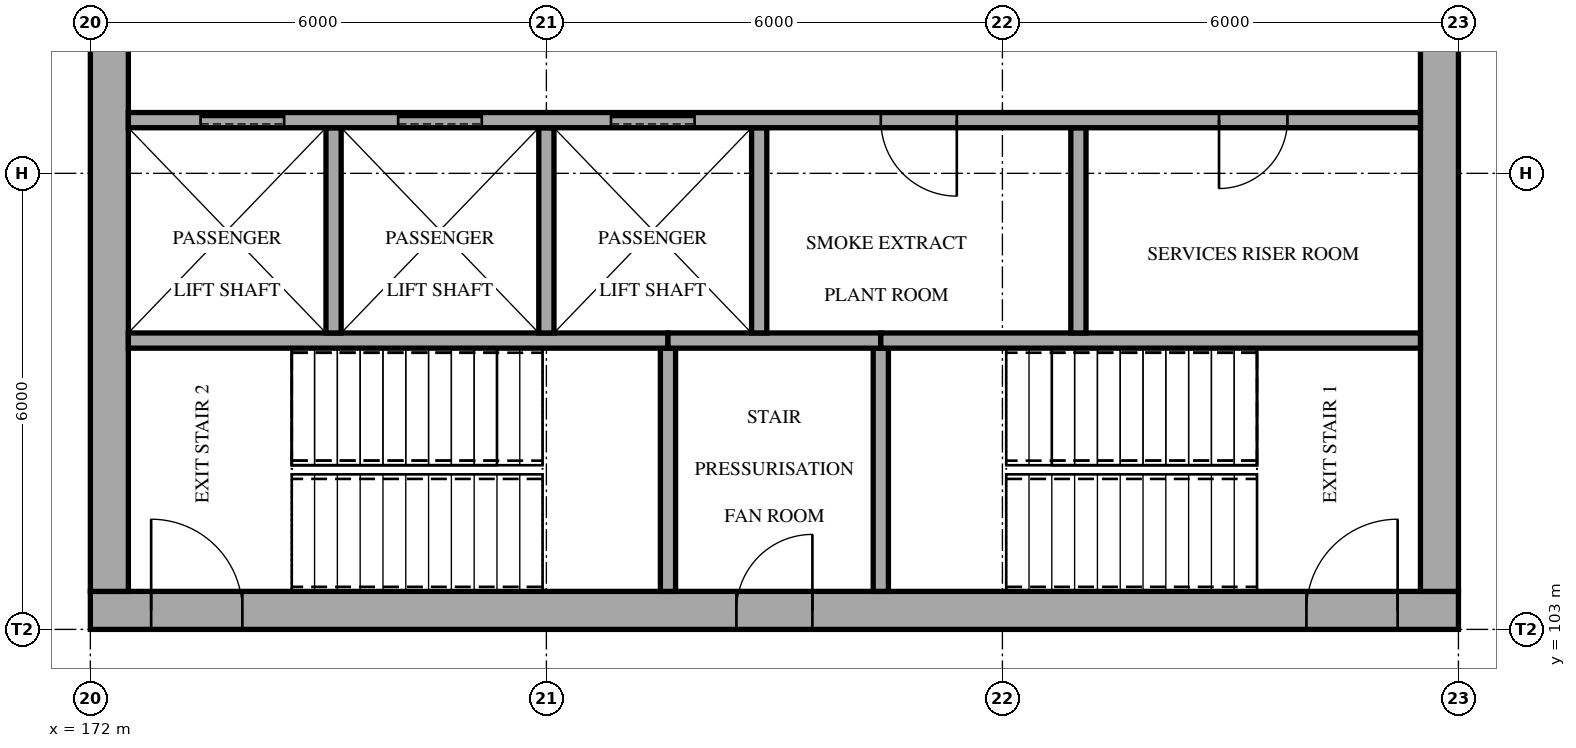
"""IFC4 building model, lengths in metres.
Left out: names, types, materials, properties, quantities, classifications, styles, units other than length and angle.
Written with IfcOpenShell. Run it as: python <this file> out.ifc"""

import sys

from ifc_helpers import new_model, si_unit, direction, frame, frame_2d, origin, place, context, subcontext, project, spatial, rectangle, extrude, element, fill, save


model = new_model("IFC4")
c1 = context("Model", 3, precision=1e-05, world=origin(), true_north=direction((0.0, 1.0)))
c2 = subcontext(c1, "Body", "Model", "MODEL_VIEW")
j1 = project(units=[si_unit("LENGTHUNIT", "METRE"), si_unit("PLANEANGLEUNIT", "RADIAN")], contexts=[c1])
p1 = place(None, origin())
s1 = spatial("IfcSite", under=j1, at=p1, CompositionType="ELEMENT")
p2 = place(p1, origin())
s2 = spatial("IfcBuilding", under=s1, at=p2, CompositionType="ELEMENT")
p3 = place(p2, frame((0.0, 0.0, 5.0)))
s3 = spatial("IfcBuildingStorey", under=s2, at=p3, CompositionType="ELEMENT", Elevation=5.0)
p4 = place(p3, frame((172.0, 103.25, 0.0), z_axis=(0.0, 0.0, 1.0), x_axis=(1.0, 0.0, 0.0)))
e1 = element("IfcWall", 1, at=p4, inside=s3, PredefinedType="SHEAR", context=c2, shape_type="SweptSolid", body=[
    extrude(rectangle(XDim=18.0, YDim=0.5, at=frame_2d((9.0, 0.0))), origin(), (0.0, 0.0, 1.0), 5.0),
])
p5 = place(p4, frame((8.5, 0.0, 0.0)))
e2 = element("IfcOpeningElement", 2, at=p5, cuts=e1, PredefinedType="OPENING", context=c2, shape_type="SweptSolid", body=[
    extrude(rectangle(XDim=1.0, YDim=2.1, at=frame_2d((0.5, 1.05))), frame((0.0, 0.26, 0.0), z_axis=(0.0, -1.0, 0.0), x_axis=(1.0, 0.0, 0.0)), (0.0, 0.0, 1.0), 0.52),
])
p6 = place(p4, frame((0.8, 0.0, 0.0)))
e3 = element("IfcOpeningElement", 3, at=p6, cuts=e1, PredefinedType="OPENING", context=c2, shape_type="SweptSolid", body=[
    extrude(rectangle(XDim=1.2, YDim=2.1, at=frame_2d((0.6, 1.05))), frame((0.0, 0.26, 0.0), z_axis=(0.0, -1.0, 0.0), x_axis=(1.0, 0.0, 0.0)), (0.0, 0.0, 1.0), 0.52),
])
p7 = place(p4, frame((16.0, 0.0, 0.0)))
e4 = element("IfcOpeningElement", 4, at=p7, cuts=e1, PredefinedType="OPENING", context=c2, shape_type="SweptSolid", body=[
    extrude(rectangle(XDim=1.2, YDim=2.1, at=frame_2d((0.6, 1.05))), frame((0.0, 0.26, 0.0), z_axis=(0.0, -1.0, 0.0), x_axis=(1.0, 0.0, 0.0)), (0.0, 0.0, 1.0), 0.52),
])
p8 = place(p3, frame((172.25, 103.5, 0.0), z_axis=(0.0, 0.0, 1.0), x_axis=(0.0, 1.0, 0.0)))
e5 = element("IfcWall", 5, at=p8, inside=s3, PredefinedType="SHEAR", context=c2, shape_type="SweptSolid", body=[
    extrude(rectangle(XDim=17.0, YDim=0.5, at=frame_2d((8.5, 0.0))), origin(), (0.0, 0.0, 1.0), 5.0),
])
p9 = place(p8, frame((7.2, 0.0, 0.0)))
e6 = element("IfcOpeningElement", 6, at=p9, cuts=e5, PredefinedType="OPENING", context=c2, shape_type="SweptSolid", body=[
    extrude(rectangle(XDim=1.4, YDim=2.1, at=frame_2d((0.7, 1.05))), frame((0.0, 0.26, 0.0), z_axis=(0.0, -1.0, 0.0), x_axis=(1.0, 0.0, 0.0)), (0.0, 0.0, 1.0), 0.52),
])
p10 = place(p3, frame((189.75, 103.5, 0.0), z_axis=(0.0, 0.0, 1.0), x_axis=(0.0, 1.0, 0.0)))
e7 = element("IfcWall", 7, at=p10, inside=s3, PredefinedType="SHEAR", context=c2, shape_type="SweptSolid", body=[
    extrude(rectangle(XDim=17.0, YDim=0.5, at=frame_2d((8.5, 0.0))), origin(), (0.0, 0.0, 1.0), 5.0),
])
p11 = place(p10, frame((7.2, 0.0, 0.0)))
e8 = element("IfcOpeningElement", 8, at=p11, cuts=e7, PredefinedType="OPENING", context=c2, shape_type="SweptSolid", body=[
    extrude(rectangle(XDim=1.4, YDim=2.1, at=frame_2d((0.7, 1.05))), frame((0.0, 0.26, 0.0), z_axis=(0.0, -1.0, 0.0), x_axis=(1.0, 0.0, 0.0)), (0.0, 0.0, 1.0), 0.52),
])
for number, where, z_axis, x_axis in (
    (9, (179.6, 103.5, 0.0), (0.0, 0.0, 1.0), (0.0, 1.0, 0.0)),
    (10, (182.4, 103.5, 0.0), (0.0, 0.0, 1.0), (0.0, 1.0, 0.0)),
):
    element("IfcWall", number, at=place(p3, frame(where, z_axis=z_axis, x_axis=x_axis)), inside=s3, PredefinedType="SOLIDWALL", context=c2, shape_type="SweptSolid", body=[
        extrude(rectangle(XDim=3.2, YDim=0.2, at=frame_2d((1.6, 0.0))), origin(), (0.0, 0.0, 1.0), 4.8),
    ])
p12 = place(p3, frame((172.5, 106.8, 0.0), z_axis=(0.0, 0.0, 1.0), x_axis=(1.0, 0.0, 0.0)))
e11 = element("IfcWall", 11, at=p12, inside=s3, PredefinedType="SOLIDWALL", context=c2, shape_type="SweptSolid", body=[
    extrude(rectangle(XDim=7.1, YDim=0.2, at=frame_2d((3.55, 0.0))), origin(), (0.0, 0.0, 1.0), 4.8),
])
p13 = place(p3, frame((179.6, 106.8, 0.0), z_axis=(0.0, 0.0, 1.0), x_axis=(1.0, 0.0, 0.0)))
e12 = element("IfcWall", 12, at=p13, inside=s3, PredefinedType="SOLIDWALL", context=c2, shape_type="SweptSolid", body=[
    extrude(rectangle(XDim=2.8, YDim=0.2, at=frame_2d((1.4, 0.0))), origin(), (0.0, 0.0, 1.0), 4.8),
])
p14 = place(p3, frame((182.4, 106.8, 0.0), z_axis=(0.0, 0.0, 1.0), x_axis=(1.0, 0.0, 0.0)))
e13 = element("IfcWall", 13, at=p14, inside=s3, PredefinedType="SOLIDWALL", context=c2, shape_type="SweptSolid", body=[
    extrude(rectangle(XDim=7.1, YDim=0.2, at=frame_2d((3.55, 0.0))), origin(), (0.0, 0.0, 1.0), 4.8),
])
for number, where, z_axis, x_axis in (
    (14, (175.2, 106.9, 0.0), (0.0, 0.0, 1.0), (0.0, 1.0, 0.0)),
    (15, (178.0, 106.9, 0.0), (0.0, 0.0, 1.0), (0.0, 1.0, 0.0)),
    (16, (180.8, 106.9, 0.0), (0.0, 0.0, 1.0), (0.0, 1.0, 0.0)),
    (17, (185.0, 106.9, 0.0), (0.0, 0.0, 1.0), (0.0, 1.0, 0.0)),
):
    element("IfcWall", number, at=place(p3, frame(where, z_axis=z_axis, x_axis=x_axis)), inside=s3, PredefinedType="SOLIDWALL", context=c2, shape_type="SweptSolid", body=[
        extrude(rectangle(XDim=2.7, YDim=0.2, at=frame_2d((1.35, 0.0))), origin(), (0.0, 0.0, 1.0), 4.8),
    ])
p15 = place(p3, frame((172.5, 109.7, 0.0), z_axis=(0.0, 0.0, 1.0), x_axis=(1.0, 0.0, 0.0)))
e18 = element("IfcWall", 18, at=p15, inside=s3, PredefinedType="SOLIDWALL", context=c2, shape_type="SweptSolid", body=[
    extrude(rectangle(XDim=17.0, YDim=0.2, at=frame_2d((8.5, 0.0))), origin(), (0.0, 0.0, 1.0), 4.8),
])
p16 = place(p15, frame((0.95, 0.0, 0.0)))
e19 = element("IfcOpeningElement", 19, at=p16, cuts=e18, PredefinedType="OPENING", context=c2, shape_type="SweptSolid", body=[
    extrude(rectangle(XDim=1.1, YDim=2.1, at=frame_2d((0.55, 1.05))), frame((0.0, 0.11, 0.0), z_axis=(0.0, -1.0, 0.0), x_axis=(1.0, 0.0, 0.0)), (0.0, 0.0, 1.0), 0.22),
])
p17 = place(p15, frame((3.55, 0.0, 0.0)))
e20 = element("IfcOpeningElement", 20, at=p17, cuts=e18, PredefinedType="OPENING", context=c2, shape_type="SweptSolid", body=[
    extrude(rectangle(XDim=1.1, YDim=2.1, at=frame_2d((0.55, 1.05))), frame((0.0, 0.11, 0.0), z_axis=(0.0, -1.0, 0.0), x_axis=(1.0, 0.0, 0.0)), (0.0, 0.0, 1.0), 0.22),
])
p18 = place(p15, frame((6.35, 0.0, 0.0)))
e21 = element("IfcOpeningElement", 21, at=p18, cuts=e18, PredefinedType="OPENING", context=c2, shape_type="SweptSolid", body=[
    extrude(rectangle(XDim=1.1, YDim=2.1, at=frame_2d((0.55, 1.05))), frame((0.0, 0.11, 0.0), z_axis=(0.0, -1.0, 0.0), x_axis=(1.0, 0.0, 0.0)), (0.0, 0.0, 1.0), 0.22),
])
p19 = place(p15, frame((9.9, 0.0, 0.0)))
e22 = element("IfcOpeningElement", 22, at=p19, cuts=e18, PredefinedType="OPENING", context=c2, shape_type="SweptSolid", body=[
    extrude(rectangle(XDim=1.0, YDim=2.1, at=frame_2d((0.5, 1.05))), frame((0.0, 0.11, 0.0), z_axis=(0.0, -1.0, 0.0), x_axis=(1.0, 0.0, 0.0)), (0.0, 0.0, 1.0), 0.22),
])
p20 = place(p15, frame((14.35, 0.0, 0.0)))
e23 = element("IfcOpeningElement", 23, at=p20, cuts=e18, PredefinedType="OPENING", context=c2, shape_type="SweptSolid", body=[
    extrude(rectangle(XDim=0.9, YDim=2.1, at=frame_2d((0.45, 1.05))), frame((0.0, 0.11, 0.0), z_axis=(0.0, -1.0, 0.0), x_axis=(1.0, 0.0, 0.0)), (0.0, 0.0, 1.0), 0.22),
])
p21 = place(p5, origin())
e24 = element("IfcDoor", 24, at=p21, inside=s3, OperationType="SINGLE_SWING_RIGHT", PredefinedType="DOOR", context=c2, shape_type="SweptSolid", body=[
    extrude(rectangle(XDim=1.0, YDim=2.1, at=frame_2d((0.5, 1.05))), frame((0.0, 0.025, 0.0), z_axis=(0.0, -1.0, 0.0), x_axis=(1.0, 0.0, 0.0)), (0.0, 0.0, 1.0), 0.05),
])
fill(e2, e24)
p22 = place(p16, origin())
e25 = element("IfcDoor", 25, at=p22, inside=s3, OperationType="SLIDING_TO_LEFT", PredefinedType="DOOR", context=c2, shape_type="SweptSolid", body=[
    extrude(rectangle(XDim=1.1, YDim=2.1, at=frame_2d((0.55, 1.05))), frame((0.0, 0.025, 0.0), z_axis=(0.0, -1.0, 0.0), x_axis=(1.0, 0.0, 0.0)), (0.0, 0.0, 1.0), 0.05),
])
fill(e19, e25)
p23 = place(p17, origin())
e26 = element("IfcDoor", 26, at=p23, inside=s3, OperationType="SLIDING_TO_LEFT", PredefinedType="DOOR", context=c2, shape_type="SweptSolid", body=[
    extrude(rectangle(XDim=1.1, YDim=2.1, at=frame_2d((0.55, 1.05))), frame((0.0, 0.025, 0.0), z_axis=(0.0, -1.0, 0.0), x_axis=(1.0, 0.0, 0.0)), (0.0, 0.0, 1.0), 0.05),
])
fill(e20, e26)
p24 = place(p18, origin())
e27 = element("IfcDoor", 27, at=p24, inside=s3, OperationType="SLIDING_TO_LEFT", PredefinedType="DOOR", context=c2, shape_type="SweptSolid", body=[
    extrude(rectangle(XDim=1.1, YDim=2.1, at=frame_2d((0.55, 1.05))), frame((0.0, 0.025, 0.0), z_axis=(0.0, -1.0, 0.0), x_axis=(1.0, 0.0, 0.0)), (0.0, 0.0, 1.0), 0.05),
])
fill(e21, e27)
p25 = place(p19, frame((1.0, 0.0, 0.0), z_axis=(0.0, 0.0, 1.0), x_axis=(-1.0, 0.0, 0.0)))
e28 = element("IfcDoor", 28, at=p25, inside=s3, OperationType="SINGLE_SWING_LEFT", PredefinedType="DOOR", context=c2, shape_type="SweptSolid", body=[
    extrude(rectangle(XDim=1.0, YDim=2.1, at=frame_2d((0.5, 1.05))), frame((0.0, 0.025, 0.0), z_axis=(0.0, -1.0, 0.0), x_axis=(1.0, 0.0, 0.0)), (0.0, 0.0, 1.0), 0.05),
])
fill(e22, e28)
p26 = place(p20, frame((0.9, 0.0, 0.0), z_axis=(0.0, 0.0, 1.0), x_axis=(-1.0, 0.0, 0.0)))
e29 = element("IfcDoor", 29, at=p26, inside=s3, OperationType="SINGLE_SWING_RIGHT", PredefinedType="DOOR", context=c2, shape_type="SweptSolid", body=[
    extrude(rectangle(XDim=0.9, YDim=2.1, at=frame_2d((0.45, 1.05))), frame((0.0, 0.025, 0.0), z_axis=(0.0, -1.0, 0.0), x_axis=(1.0, 0.0, 0.0)), (0.0, 0.0, 1.0), 0.05),
])
fill(e23, e29)
p27 = place(p6, origin())
e30 = element("IfcDoor", 30, at=p27, inside=s3, OperationType="SINGLE_SWING_LEFT", PredefinedType="DOOR", context=c2, shape_type="SweptSolid", body=[
    extrude(rectangle(XDim=1.2, YDim=2.1, at=frame_2d((0.6, 1.05))), frame((0.0, 0.025, 0.0), z_axis=(0.0, -1.0, 0.0), x_axis=(1.0, 0.0, 0.0)), (0.0, 0.0, 1.0), 0.05),
])
fill(e3, e30)
p28 = place(p7, origin())
e31 = element("IfcDoor", 31, at=p28, inside=s3, OperationType="SINGLE_SWING_RIGHT", PredefinedType="DOOR", context=c2, shape_type="SweptSolid", body=[
    extrude(rectangle(XDim=1.2, YDim=2.1, at=frame_2d((0.6, 1.05))), frame((0.0, 0.025, 0.0), z_axis=(0.0, -1.0, 0.0), x_axis=(1.0, 0.0, 0.0)), (0.0, 0.0, 1.0), 0.05),
])
fill(e4, e31)
save(model, sys.argv[1])
